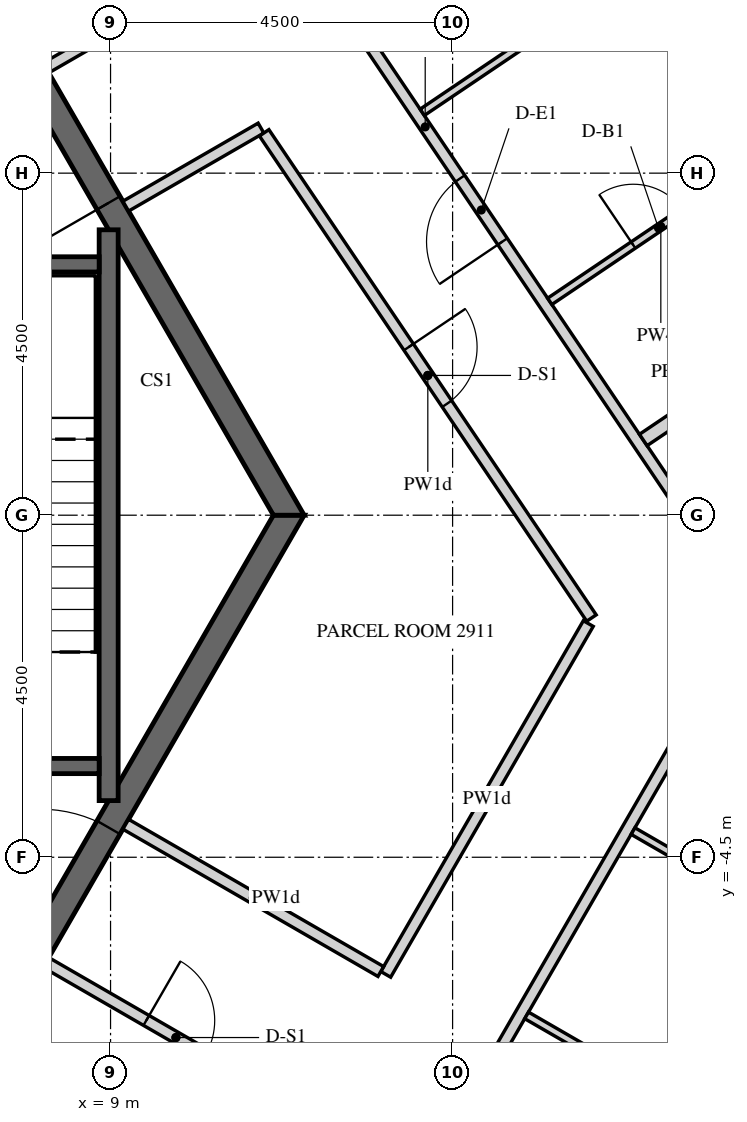
"""IFC4 building model, lengths in metres.
Left out: names, types, materials, properties, quantities, classifications, styles, units other than length and angle.
Written with IfcOpenShell. Run it as: python <this file> out.ifc"""

import sys

from ifc_helpers import new_model, si_unit, direction, frame, frame_2d, origin, place, context, subcontext, project, spatial, polyline, rectangle, outline, extrude, element, fill, save


model = new_model("IFC4")
c1 = context("Model", 3, precision=1e-05, world=origin(), true_north=direction((0.0, 1.0)))
c2 = subcontext(c1, "Body", "Model", "MODEL_VIEW")
j1 = project(units=[si_unit("LENGTHUNIT", "METRE"), si_unit("PLANEANGLEUNIT", "RADIAN")], contexts=[c1])
p1 = place(None, origin())
s1 = spatial("IfcSite", under=j1, at=p1, CompositionType="ELEMENT")
p2 = place(p1, origin())
s2 = spatial("IfcBuilding", under=s1, at=p2, CompositionType="ELEMENT")
p3 = place(p2, frame((0.0, 0.0, 369.0)))
s3 = spatial("IfcBuildingStorey", under=s2, at=p3, CompositionType="ELEMENT", Elevation=369.0)
p4 = place(p3, frame((15.273, -21.097, -0.15), z_axis=(0.0, 0.0, 1.0), x_axis=(0.499997453958, 0.866026873738, 0.0)))
e1 = element("IfcWall", 1, at=p4, inside=s3, PredefinedType="SOLIDWALL", context=c2, shape_type="SweptSolid", body=[
    extrude(outline(polyline([(-0.018, -0.225), (23.152, -0.225), (23.11, 0.225), (0.018, 0.225), (-0.018, -0.225)])), origin(), (0.0, 0.0, 1.0), 3.9),
])
p5 = place(p4, frame((1.366, 0.0, 0.45)))
e2 = element("IfcOpeningElement", 2, at=p5, cuts=e1, PredefinedType="OPENING", context=c2, shape_type="SweptSolid", body=[
    extrude(rectangle(XDim=2.4, YDim=3.0, at=frame_2d((1.2, 1.5))), frame((0.0, 0.235, 0.0), z_axis=(0.0, -1.0, 0.0), x_axis=(1.0, 0.0, 0.0)), (0.0, 0.0, 1.0), 0.47),
])
p6 = place(p4, frame((4.966, 0.0, 0.45)))
e3 = element("IfcOpeningElement", 3, at=p6, cuts=e1, PredefinedType="OPENING", context=c2, shape_type="SweptSolid", body=[
    extrude(rectangle(XDim=2.4, YDim=3.0, at=frame_2d((1.2, 1.5))), frame((0.0, 0.235, 0.0), z_axis=(0.0, -1.0, 0.0), x_axis=(1.0, 0.0, 0.0)), (0.0, 0.0, 1.0), 0.47),
])
p7 = place(p4, frame((8.566, 0.0, 0.45)))
e4 = element("IfcOpeningElement", 4, at=p7, cuts=e1, PredefinedType="OPENING", context=c2, shape_type="SweptSolid", body=[
    extrude(rectangle(XDim=2.4, YDim=3.0, at=frame_2d((1.2, 1.5))), frame((0.0, 0.235, 0.0), z_axis=(0.0, -1.0, 0.0), x_axis=(1.0, 0.0, 0.0)), (0.0, 0.0, 1.0), 0.47),
])
p8 = place(p4, frame((12.166, 0.0, 0.45)))
e5 = element("IfcOpeningElement", 5, at=p8, cuts=e1, PredefinedType="OPENING", context=c2, shape_type="SweptSolid", body=[
    extrude(rectangle(XDim=2.4, YDim=3.0, at=frame_2d((1.2, 1.5))), frame((0.0, 0.235, 0.0), z_axis=(0.0, -1.0, 0.0), x_axis=(1.0, 0.0, 0.0)), (0.0, 0.0, 1.0), 0.47),
])
p9 = place(p4, frame((15.766, 0.0, 0.45)))
e6 = element("IfcOpeningElement", 6, at=p9, cuts=e1, PredefinedType="OPENING", context=c2, shape_type="SweptSolid", body=[
    extrude(rectangle(XDim=2.4, YDim=3.0, at=frame_2d((1.2, 1.5))), frame((0.0, 0.235, 0.0), z_axis=(0.0, -1.0, 0.0), x_axis=(1.0, 0.0, 0.0)), (0.0, 0.0, 1.0), 0.47),
])
p10 = place(p4, frame((19.366, 0.0, 0.45)))
e7 = element("IfcOpeningElement", 7, at=p10, cuts=e1, PredefinedType="OPENING", context=c2, shape_type="SweptSolid", body=[
    extrude(rectangle(XDim=2.4, YDim=3.0, at=frame_2d((1.2, 1.5))), frame((0.0, 0.235, 0.0), z_axis=(0.0, -1.0, 0.0), x_axis=(1.0, 0.0, 0.0)), (0.0, 0.0, 1.0), 0.47),
])
p11 = place(p3, frame((24.37, 2.811, -0.15), z_axis=(0.0, 0.0, 1.0), x_axis=(-0.559187034749, 0.829041531027, 0.0)))
e8 = element("IfcWall", 8, at=p11, inside=s3, PredefinedType="SOLIDWALL", context=c2, shape_type="SweptSolid", body=[
    extrude(outline(polyline([(0.225, -0.225), (20.506, -0.225), (20.957, 0.225), (-0.225, 0.225), (0.225, -0.225)])), origin(), (0.0, 0.0, 1.0), 3.9),
])
p12 = place(p11, frame((0.325, 0.0, 1.05)))
e9 = element("IfcOpeningElement", 9, at=p12, cuts=e8, PredefinedType="OPENING", context=c2, shape_type="SweptSolid", body=[
    extrude(rectangle(XDim=0.9, YDim=1.5, at=frame_2d((0.45, 0.75))), frame((0.0, 0.235, 0.0), z_axis=(0.0, -1.0, 0.0), x_axis=(1.0, 0.0, 0.0)), (0.0, 0.0, 1.0), 0.47),
])
p13 = place(p11, frame((1.525, 0.0, 0.15)))
e10 = element("IfcOpeningElement", 10, at=p13, cuts=e8, PredefinedType="OPENING", context=c2, shape_type="SweptSolid", body=[
    extrude(rectangle(XDim=1.2, YDim=2.4, at=frame_2d((0.6, 1.2))), frame((0.0, 0.235, 0.0), z_axis=(0.0, -1.0, 0.0), x_axis=(1.0, 0.0, 0.0)), (0.0, 0.0, 1.0), 0.47),
])
p14 = place(p11, frame((3.766, 0.0, 1.05)))
e11 = element("IfcOpeningElement", 11, at=p14, cuts=e8, PredefinedType="OPENING", context=c2, shape_type="SweptSolid", body=[
    extrude(rectangle(XDim=0.9, YDim=1.5, at=frame_2d((0.45, 0.75))), frame((0.0, 0.235, 0.0), z_axis=(0.0, -1.0, 0.0), x_axis=(1.0, 0.0, 0.0)), (0.0, 0.0, 1.0), 0.47),
])
p15 = place(p11, frame((4.966, 0.0, 0.15)))
e12 = element("IfcOpeningElement", 12, at=p15, cuts=e8, PredefinedType="OPENING", context=c2, shape_type="SweptSolid", body=[
    extrude(rectangle(XDim=1.2, YDim=2.4, at=frame_2d((0.6, 1.2))), frame((0.0, 0.235, 0.0), z_axis=(0.0, -1.0, 0.0), x_axis=(1.0, 0.0, 0.0)), (0.0, 0.0, 1.0), 0.47),
])
p16 = place(p11, frame((7.366, 0.0, 1.05)))
e13 = element("IfcOpeningElement", 13, at=p16, cuts=e8, PredefinedType="OPENING", context=c2, shape_type="SweptSolid", body=[
    extrude(rectangle(XDim=0.9, YDim=1.5, at=frame_2d((0.45, 0.75))), frame((0.0, 0.235, 0.0), z_axis=(0.0, -1.0, 0.0), x_axis=(1.0, 0.0, 0.0)), (0.0, 0.0, 1.0), 0.47),
])
p17 = place(p11, frame((8.566, 0.0, 0.15)))
e14 = element("IfcOpeningElement", 14, at=p17, cuts=e8, PredefinedType="OPENING", context=c2, shape_type="SweptSolid", body=[
    extrude(rectangle(XDim=1.2, YDim=2.4, at=frame_2d((0.6, 1.2))), frame((0.0, 0.235, 0.0), z_axis=(0.0, -1.0, 0.0), x_axis=(1.0, 0.0, 0.0)), (0.0, 0.0, 1.0), 0.47),
])
p18 = place(p11, frame((10.966, 0.0, 1.05)))
e15 = element("IfcOpeningElement", 15, at=p18, cuts=e8, PredefinedType="OPENING", context=c2, shape_type="SweptSolid", body=[
    extrude(rectangle(XDim=0.9, YDim=1.5, at=frame_2d((0.45, 0.75))), frame((0.0, 0.235, 0.0), z_axis=(0.0, -1.0, 0.0), x_axis=(1.0, 0.0, 0.0)), (0.0, 0.0, 1.0), 0.47),
])
p19 = place(p11, frame((12.166, 0.0, 0.15)))
e16 = element("IfcOpeningElement", 16, at=p19, cuts=e8, PredefinedType="OPENING", context=c2, shape_type="SweptSolid", body=[
    extrude(rectangle(XDim=1.2, YDim=2.4, at=frame_2d((0.6, 1.2))), frame((0.0, 0.235, 0.0), z_axis=(0.0, -1.0, 0.0), x_axis=(1.0, 0.0, 0.0)), (0.0, 0.0, 1.0), 0.47),
])
p20 = place(p11, frame((14.566, 0.0, 1.05)))
e17 = element("IfcOpeningElement", 17, at=p20, cuts=e8, PredefinedType="OPENING", context=c2, shape_type="SweptSolid", body=[
    extrude(rectangle(XDim=0.9, YDim=1.5, at=frame_2d((0.45, 0.75))), frame((0.0, 0.235, 0.0), z_axis=(0.0, -1.0, 0.0), x_axis=(1.0, 0.0, 0.0)), (0.0, 0.0, 1.0), 0.47),
])
p21 = place(p11, frame((15.766, 0.0, 0.15)))
e18 = element("IfcOpeningElement", 18, at=p21, cuts=e8, PredefinedType="OPENING", context=c2, shape_type="SweptSolid", body=[
    extrude(rectangle(XDim=1.2, YDim=2.4, at=frame_2d((0.6, 1.2))), frame((0.0, 0.235, 0.0), z_axis=(0.0, -1.0, 0.0), x_axis=(1.0, 0.0, 0.0)), (0.0, 0.0, 1.0), 0.47),
])
p22 = place(p11, frame((18.007, 0.0, 1.05)))
e19 = element("IfcOpeningElement", 19, at=p22, cuts=e8, PredefinedType="OPENING", context=c2, shape_type="SweptSolid", body=[
    extrude(rectangle(XDim=0.9, YDim=1.5, at=frame_2d((0.45, 0.75))), frame((0.0, 0.235, 0.0), z_axis=(0.0, -1.0, 0.0), x_axis=(1.0, 0.0, 0.0)), (0.0, 0.0, 1.0), 0.47),
])
p23 = place(p11, frame((19.207, 0.0, 0.15)))
e20 = element("IfcOpeningElement", 20, at=p23, cuts=e8, PredefinedType="OPENING", context=c2, shape_type="SweptSolid", body=[
    extrude(rectangle(XDim=1.2, YDim=2.4, at=frame_2d((0.6, 1.2))), frame((0.0, 0.235, 0.0), z_axis=(0.0, -1.0, 0.0), x_axis=(1.0, 0.0, 0.0)), (0.0, 0.0, 1.0), 0.47),
])
p24 = place(p3, frame((5.673, -9.825, -0.15), z_axis=(0.0, 0.0, 1.0), x_axis=(0.499995046907, 0.866028263435, 0.0)))
e21 = element("IfcWall", 21, at=p24, inside=s3, PredefinedType="SHEAR", context=c2, shape_type="SweptSolid", body=[
    extrude(outline(polyline([(-0.101, -0.175), (11.446, -0.175), (11.244, 0.175), (0.101, 0.175), (-0.101, -0.175)])), origin(), (0.0, 0.0, 1.0), 3.9),
])
p25 = place(p24, frame((4.801, 0.0, 0.15)))
e22 = element("IfcOpeningElement", 22, at=p25, cuts=e21, PredefinedType="OPENING", context=c2, shape_type="SweptSolid", body=[
    extrude(rectangle(XDim=1.8, YDim=2.4, at=frame_2d((0.9, 1.2))), frame((0.0, 0.185, 0.0), z_axis=(0.0, -1.0, 0.0), x_axis=(1.0, 0.0, 0.0)), (0.0, 0.0, 1.0), 0.37),
])
p26 = place(p3, frame((11.345, 0.0, -0.15), z_axis=(0.0, 0.0, 1.0), x_axis=(-0.499995046907, 0.866028263435, 0.0)))
e23 = element("IfcWall", 23, at=p26, inside=s3, PredefinedType="SHEAR", context=c2, shape_type="SweptSolid", body=[
    extrude(outline(polyline([(-0.101, -0.175), (11.446, -0.175), (11.244, 0.175), (0.101, 0.175), (-0.101, -0.175)])), origin(), (0.0, 0.0, 1.0), 3.9),
])
p27 = place(p26, frame((4.744, 0.0, 0.15)))
e24 = element("IfcOpeningElement", 24, at=p27, cuts=e23, PredefinedType="OPENING", context=c2, shape_type="SweptSolid", body=[
    extrude(rectangle(XDim=1.8, YDim=2.4, at=frame_2d((0.9, 1.2))), frame((0.0, 0.185, 0.0), z_axis=(0.0, -1.0, 0.0), x_axis=(1.0, 0.0, 0.0)), (0.0, 0.0, 1.0), 0.37),
])
p28 = place(p3, frame((8.975, -3.755, -0.25), z_axis=(0.0, 0.0, 1.0), x_axis=(0.0, 1.0, 0.0)))
e25 = element("IfcWall", 25, at=p28, inside=s3, PredefinedType="SHEAR", context=c2, shape_type="SweptSolid", body=[
    extrude(rectangle(XDim=7.51, YDim=0.25, at=frame_2d((3.755, 0.0))), origin(), (0.0, 0.0, 1.0), 3.9),
])
p29 = place(p3, frame((5.9, 3.3, -0.25), z_axis=(0.0, 0.0, 1.0), x_axis=(1.0, 0.0, 0.0)))
e26 = element("IfcWall", 26, at=p29, inside=s3, PredefinedType="SHEAR", context=c2, shape_type="SweptSolid", body=[
    extrude(rectangle(XDim=2.95, YDim=0.2, at=frame_2d((1.475, 0.0))), origin(), (0.0, 0.0, 1.0), 3.9),
])
p30 = place(p3, frame((5.9, -3.3, -0.25), z_axis=(0.0, 0.0, 1.0), x_axis=(1.0, 0.0, 0.0)))
e27 = element("IfcWall", 27, at=p30, inside=s3, PredefinedType="SHEAR", context=c2, shape_type="SweptSolid", body=[
    extrude(rectangle(XDim=2.95, YDim=0.2, at=frame_2d((1.475, 0.0))), origin(), (0.0, 0.0, 1.0), 3.9),
])
p31 = place(p30, frame((0.875, 0.0, 0.25)))
e28 = element("IfcOpeningElement", 28, at=p31, cuts=e27, PredefinedType="OPENING", context=c2, shape_type="SweptSolid", body=[
    extrude(rectangle(XDim=1.2, YDim=2.4, at=frame_2d((0.6, 1.2))), frame((0.0, 0.11, 0.0), z_axis=(0.0, -1.0, 0.0), x_axis=(1.0, 0.0, 0.0)), (0.0, 0.0, 1.0), 0.22),
])
p32 = place(p3, frame((10.697, -12.973, 0.0), z_axis=(0.0, 0.0, 1.0), x_axis=(0.499991115059, 0.866030533446, 0.0)))
e29 = element("IfcWall", 29, at=p32, inside=s3, PredefinedType="PARTITIONING", context=c2, shape_type="SweptSolid", body=[
    extrude(rectangle(XDim=13.504, YDim=0.15, at=frame_2d((6.752, 0.0))), origin(), (0.0, 0.0, 1.0), 2.47),
])
p33 = place(p32, frame((3.175, 0.0, 0.0)))
e30 = element("IfcOpeningElement", 30, at=p33, cuts=e29, PredefinedType="OPENING", context=c2, shape_type="SweptSolid", body=[
    extrude(rectangle(XDim=1.0, YDim=2.1, at=frame_2d((0.5, 1.05))), frame((0.0, 0.085, 0.0), z_axis=(0.0, -1.0, 0.0), x_axis=(1.0, 0.0, 0.0)), (0.0, 0.0, 1.0), 0.17),
])
p34 = place(p3, frame((17.401, -1.21, 0.0), z_axis=(0.0, 0.0, 1.0), x_axis=(-0.559186729505, 0.829041736914, 0.0)))
e31 = element("IfcWall", 31, at=p34, inside=s3, PredefinedType="PARTITIONING", context=c2, shape_type="SweptSolid", body=[
    extrude(rectangle(XDim=15.243, YDim=0.15, at=frame_2d((7.621, 0.0))), origin(), (0.0, 0.0, 1.0), 2.47),
])
p35 = place(p34, frame((5.802, 0.0, 0.0)))
e32 = element("IfcOpeningElement", 32, at=p35, cuts=e31, PredefinedType="OPENING", context=c2, shape_type="SweptSolid", body=[
    extrude(rectangle(XDim=1.0, YDim=2.1, at=frame_2d((0.5, 1.05))), frame((0.0, 0.085, 0.0), z_axis=(0.0, -1.0, 0.0), x_axis=(1.0, 0.0, 0.0)), (0.0, 0.0, 1.0), 0.17),
])
p36 = place(p3, frame((9.2, 4.066, 0.0), z_axis=(0.0, 0.0, 1.0), x_axis=(0.866011447264, 0.500024172624, 0.0)))
e33 = element("IfcWall", 33, at=p36, inside=s3, PredefinedType="PARTITIONING", context=c2, shape_type="SweptSolid", body=[
    extrude(rectangle(XDim=2.055, YDim=0.15, at=frame_2d((1.027, 0.0))), origin(), (0.0, 0.0, 1.0), 2.47),
])
p37 = place(p3, frame((11.021, 5.031, 0.0), z_axis=(0.0, 0.0, 1.0), x_axis=(0.559191842266, -0.829038288346, 0.0)))
e34 = element("IfcWall", 34, at=p37, inside=s3, PredefinedType="PARTITIONING", context=c2, shape_type="SweptSolid", body=[
    extrude(rectangle(XDim=7.7, YDim=0.15, at=frame_2d((3.85, 0.0))), origin(), (0.0, 0.0, 1.0), 2.47),
])
p38 = place(p37, frame((3.4, 0.0, 0.0)))
e35 = element("IfcOpeningElement", 35, at=p38, cuts=e34, PredefinedType="OPENING", context=c2, shape_type="SweptSolid", body=[
    extrude(rectangle(XDim=0.9, YDim=2.1, at=frame_2d((0.45, 1.05))), frame((0.0, 0.085, 0.0), z_axis=(0.0, -1.0, 0.0), x_axis=(1.0, 0.0, 0.0)), (0.0, 0.0, 1.0), 0.17),
])
p39 = place(p3, frame((15.285, -1.425, 0.0), z_axis=(0.0, 0.0, 1.0), x_axis=(-0.499972278664, -0.866041408113, 0.0)))
e36 = element("IfcWall", 36, at=p39, inside=s3, PredefinedType="PARTITIONING", context=c2, shape_type="SweptSolid", body=[
    extrude(rectangle(XDim=5.329, YDim=0.15, at=frame_2d((2.665, 0.0))), origin(), (0.0, 0.0, 1.0), 2.47),
])
p40 = place(p3, frame((12.555, -6.003, 0.0), z_axis=(0.0, 0.0, 1.0), x_axis=(-0.866016658288, 0.500015147339, 0.0)))
e37 = element("IfcWall", 37, at=p40, inside=s3, PredefinedType="PARTITIONING", context=c2, shape_type="SweptSolid", body=[
    extrude(rectangle(XDim=3.875, YDim=0.15, at=frame_2d((1.938, 0.0))), origin(), (0.0, 0.0, 1.0), 2.47),
])
p41 = place(p3, frame((8.15, -5.884, 0.0), z_axis=(0.0, 0.0, 1.0), x_axis=(0.866020906874, -0.500007788796, 0.0)))
e38 = element("IfcWall", 38, at=p41, inside=s3, PredefinedType="PARTITIONING", context=c2, shape_type="SweptSolid", body=[
    extrude(rectangle(XDim=3.95, YDim=0.15, at=frame_2d((1.975, 0.0))), origin(), (0.0, 0.0, 1.0), 2.47),
])
p42 = place(p41, frame((1.525, 0.0, 0.0)))
e39 = element("IfcOpeningElement", 39, at=p42, cuts=e38, PredefinedType="OPENING", context=c2, shape_type="SweptSolid", body=[
    extrude(rectangle(XDim=0.9, YDim=2.1, at=frame_2d((0.45, 1.05))), frame((0.0, 0.085, 0.0), z_axis=(0.0, -1.0, 0.0), x_axis=(1.0, 0.0, 0.0)), (0.0, 0.0, 1.0), 0.17),
])
p43 = place(p3, frame((9.737, 6.801, 0.0), z_axis=(0.0, 0.0, 1.0), x_axis=(-0.866045829247, -0.499964620392, 0.0)))
e40 = element("IfcWall", 40, at=p43, inside=s3, PredefinedType="PARTITIONING", context=c2, shape_type="SweptSolid", body=[
    extrude(rectangle(XDim=1.833, YDim=0.15, at=frame_2d((0.917, 0.0))), origin(), (0.0, 0.0, 1.0), 2.47),
])
p44 = place(p3, frame((15.874, -4.156, 0.0), z_axis=(0.0, 0.0, 1.0), x_axis=(0.866031034943, -0.499990246421, 0.0)))
e41 = element("IfcWall", 41, at=p44, inside=s3, PredefinedType="PARTITIONING", context=c2, shape_type="SweptSolid", body=[
    extrude(rectangle(XDim=3.525, YDim=0.1, at=frame_2d((1.762, 0.0))), origin(), (0.0, 0.0, 1.0), 2.47),
])
p45 = place(p3, frame((22.413, 5.309, 0.0), z_axis=(0.0, 0.0, 1.0), x_axis=(-0.82903328576, -0.559199258853, 0.0)))
e42 = element("IfcWall", 42, at=p45, inside=s3, PredefinedType="PARTITIONING", context=c2, shape_type="SweptSolid", body=[
    extrude(rectangle(XDim=7.725, YDim=0.18, at=frame_2d((3.863, 0.0))), origin(), (0.0, 0.0, 1.0), 2.47),
])
p46 = place(p3, frame((17.483, -8.318, 0.0), z_axis=(0.0, 0.0, 1.0), x_axis=(-0.866025305473, 0.500000170281, 0.0)))
e43 = element("IfcWall", 43, at=p46, inside=s3, PredefinedType="PARTITIONING", context=c2, shape_type="SweptSolid", body=[
    extrude(rectangle(XDim=3.475, YDim=0.1, at=frame_2d((1.738, 0.0))), origin(), (0.0, 0.0, 1.0), 2.47),
])
p47 = place(p3, frame((14.485, 9.552, 0.0), z_axis=(0.0, 0.0, 1.0), x_axis=(0.559171259418, -0.829052171242, 0.0)))
e44 = element("IfcWall", 44, at=p47, inside=s3, PredefinedType="PARTITIONING", context=c2, shape_type="SweptSolid", body=[
    extrude(rectangle(XDim=4.352, YDim=0.1, at=frame_2d((2.176, 0.0))), origin(), (0.0, 0.0, 1.0), 2.47),
])
p48 = place(p47, frame((2.95, 0.0, 0.0)))
e45 = element("IfcOpeningElement", 45, at=p48, cuts=e44, PredefinedType="OPENING", context=c2, shape_type="SweptSolid", body=[
    extrude(rectangle(XDim=0.9, YDim=2.1, at=frame_2d((0.45, 1.05))), frame((0.0, 0.06, 0.0), z_axis=(0.0, -1.0, 0.0), x_axis=(1.0, 0.0, 0.0)), (0.0, 0.0, 1.0), 0.12),
])
p49 = place(p47, frame((0.9, 0.0, 0.0)))
e46 = element("IfcOpeningElement", 46, at=p49, cuts=e44, PredefinedType="OPENING", context=c2, shape_type="SweptSolid", body=[
    extrude(rectangle(XDim=0.9, YDim=2.1, at=frame_2d((0.45, 1.05))), frame((0.0, 0.06, 0.0), z_axis=(0.0, -1.0, 0.0), x_axis=(1.0, 0.0, 0.0)), (0.0, 0.0, 1.0), 0.12),
])
p50 = place(p3, frame((14.778, 2.813, 0.0), z_axis=(0.0, 0.0, 1.0), x_axis=(0.829033300448, 0.559199237078, 0.0)))
e47 = element("IfcWall", 47, at=p50, inside=s3, PredefinedType="PARTITIONING", context=c2, shape_type="SweptSolid", body=[
    extrude(rectangle(XDim=3.525, YDim=0.1, at=frame_2d((1.763, 0.0))), origin(), (0.0, 0.0, 1.0), 2.47),
])
p51 = place(p50, frame((1.325, 0.0, 0.0)))
e48 = element("IfcOpeningElement", 48, at=p51, cuts=e47, PredefinedType="OPENING", context=c2, shape_type="SweptSolid", body=[
    extrude(rectangle(XDim=0.8, YDim=2.1, at=frame_2d((0.4, 1.05))), frame((0.0, 0.06, 0.0), z_axis=(0.0, -1.0, 0.0), x_axis=(1.0, 0.0, 0.0)), (0.0, 0.0, 1.0), 0.12),
])
p52 = place(p3, frame((15.982, 7.244, 0.0), z_axis=(0.0, 0.0, 1.0), x_axis=(-0.829044102949, -0.559183221642, 0.0)))
e49 = element("IfcWall", 49, at=p52, inside=s3, PredefinedType="PARTITIONING", context=c2, shape_type="SweptSolid", body=[
    extrude(rectangle(XDim=3.475, YDim=0.1, at=frame_2d((1.737, 0.0))), origin(), (0.0, 0.0, 1.0), 2.47),
])
p53 = place(p27, origin())
e50 = element("IfcDoor", 50, at=p53, inside=s3, OperationType="DOUBLE_DOOR_SINGLE_SWING", PredefinedType="DOOR", context=c2, shape_type="SweptSolid", body=[
    extrude(rectangle(XDim=1.8, YDim=2.4, at=frame_2d((0.9, 1.2))), frame((0.0, 0.025, 0.0), z_axis=(0.0, -1.0, 0.0), x_axis=(1.0, 0.0, 0.0)), (0.0, 0.0, 1.0), 0.05),
])
fill(e24, e50)
p54 = place(p25, origin())
e51 = element("IfcDoor", 51, at=p54, inside=s3, OperationType="DOUBLE_DOOR_SINGLE_SWING", PredefinedType="DOOR", context=c2, shape_type="SweptSolid", body=[
    extrude(rectangle(XDim=1.8, YDim=2.4, at=frame_2d((0.9, 1.2))), frame((0.0, 0.025, 0.0), z_axis=(0.0, -1.0, 0.0), x_axis=(1.0, 0.0, 0.0)), (0.0, 0.0, 1.0), 0.05),
])
fill(e22, e51)
p55 = place(p35, origin())
e52 = element("IfcDoor", 52, at=p55, inside=s3, OperationType="SINGLE_SWING_RIGHT", PredefinedType="DOOR", context=c2, shape_type="SweptSolid", body=[
    extrude(rectangle(XDim=1.0, YDim=2.1, at=frame_2d((0.5, 1.05))), frame((0.0, 0.025, 0.0), z_axis=(0.0, -1.0, 0.0), x_axis=(1.0, 0.0, 0.0)), (0.0, 0.0, 1.0), 0.05),
])
fill(e32, e52)
p56 = place(p51, origin())
e53 = element("IfcDoor", 53, at=p56, inside=s3, OperationType="SINGLE_SWING_RIGHT", PredefinedType="DOOR", context=c2, shape_type="SweptSolid", body=[
    extrude(rectangle(XDim=0.8, YDim=2.1, at=frame_2d((0.4, 1.05))), frame((0.0, 0.025, 0.0), z_axis=(0.0, -1.0, 0.0), x_axis=(1.0, 0.0, 0.0)), (0.0, 0.0, 1.0), 0.05),
])
fill(e48, e53)
p57 = place(p38, origin())
e54 = element("IfcDoor", 54, at=p57, inside=s3, OperationType="SINGLE_SWING_LEFT", PredefinedType="DOOR", context=c2, shape_type="SweptSolid", body=[
    extrude(rectangle(XDim=0.9, YDim=2.1, at=frame_2d((0.45, 1.05))), frame((0.0, 0.025, 0.0), z_axis=(0.0, -1.0, 0.0), x_axis=(1.0, 0.0, 0.0)), (0.0, 0.0, 1.0), 0.05),
])
fill(e35, e54)
p58 = place(p42, origin())
e55 = element("IfcDoor", 55, at=p58, inside=s3, OperationType="SINGLE_SWING_LEFT", PredefinedType="DOOR", context=c2, shape_type="SweptSolid", body=[
    extrude(rectangle(XDim=0.9, YDim=2.1, at=frame_2d((0.45, 1.05))), frame((0.0, 0.025, 0.0), z_axis=(0.0, -1.0, 0.0), x_axis=(1.0, 0.0, 0.0)), (0.0, 0.0, 1.0), 0.05),
])
fill(e39, e55)
save(model, sys.argv[1])
